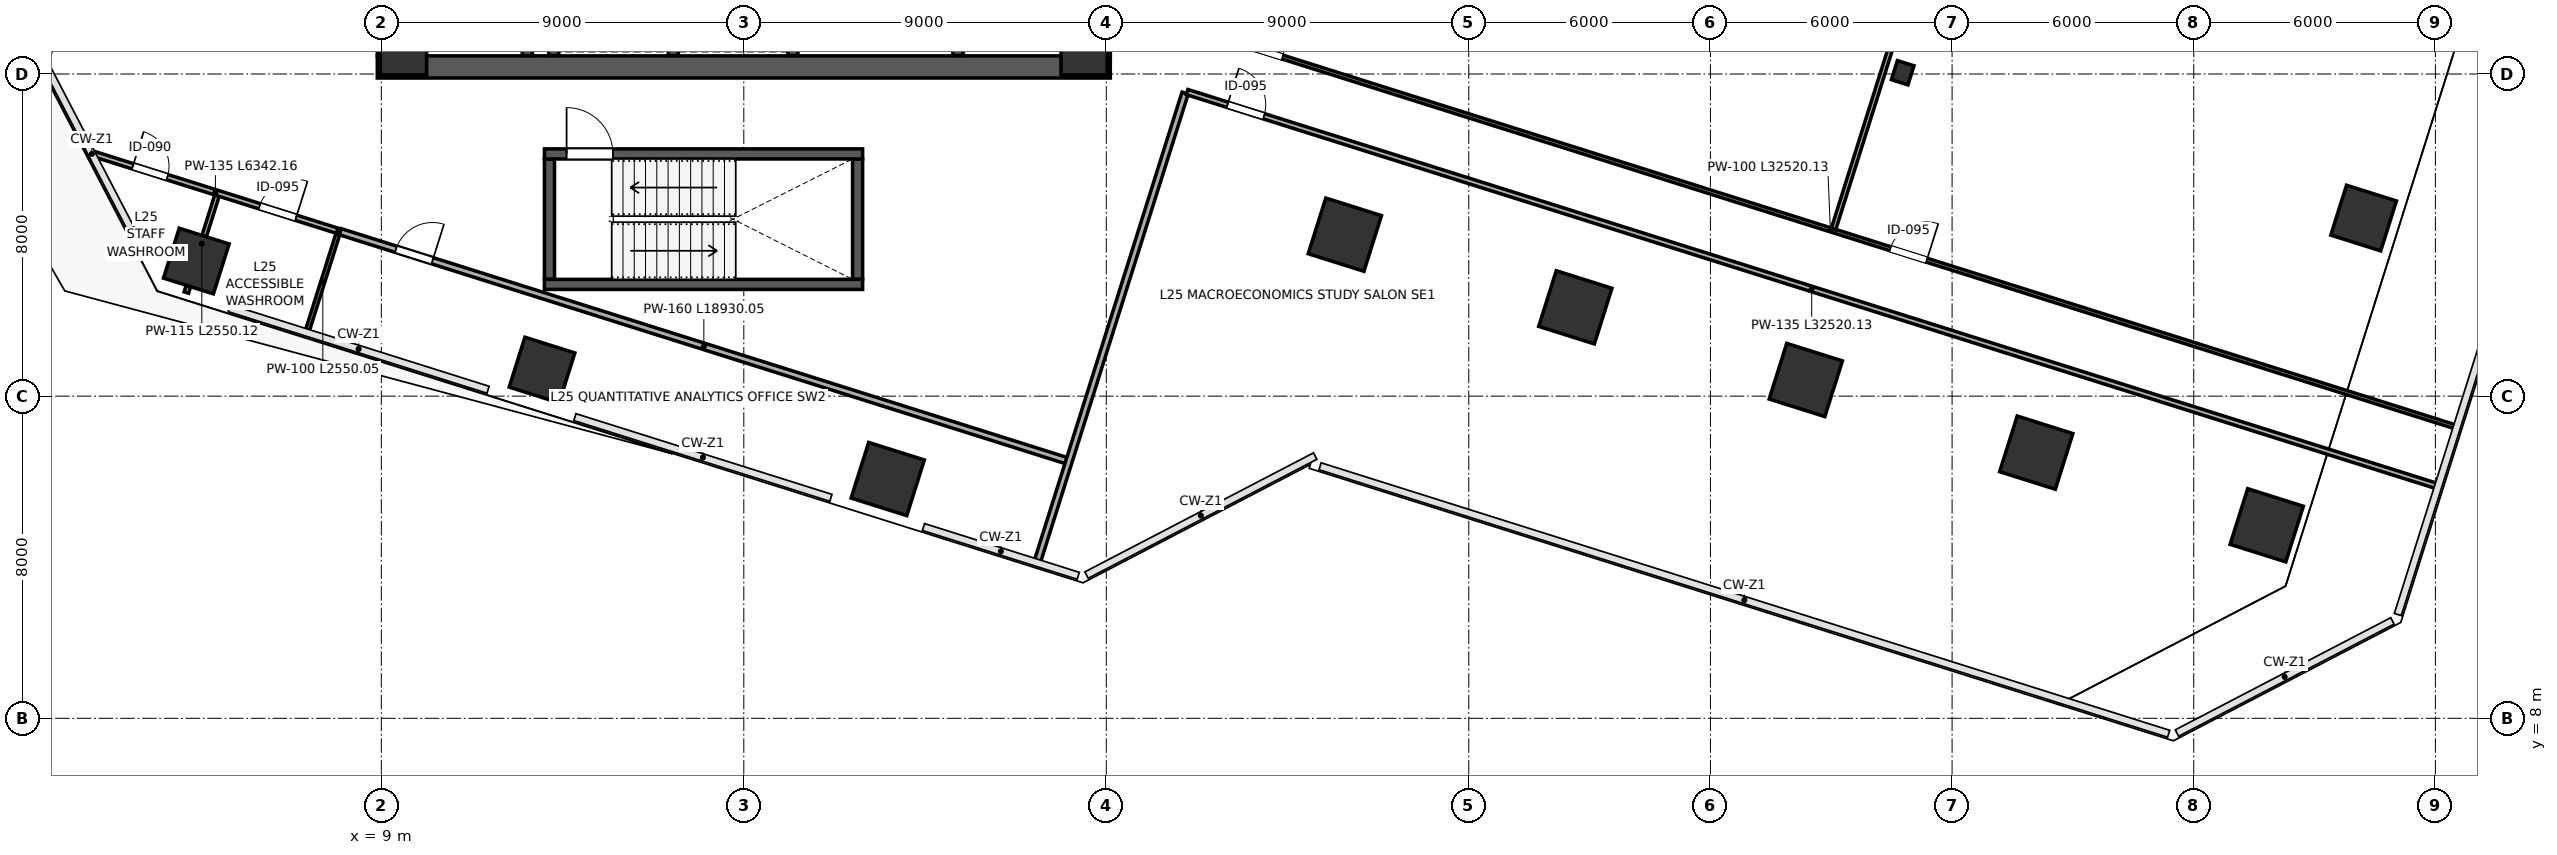
"""IFC4 building model, lengths in metres.
Left out: names, types, materials, properties, quantities, classifications, styles, units other than length and angle.
Written with IfcOpenShell. Run it as: python <this file> out.ifc"""

import sys

from ifc_helpers import new_model, si_unit, direction, frame, frame_2d, origin, origin_2d, place, context, subcontext, project, spatial, rectangle, i_section, extrude, source, transform, mapped, element, fill, save


model = new_model("IFC4")
c1 = context("Model", 3, precision=1e-05, world=origin(), true_north=direction((0.0, 1.0)))
c2 = subcontext(c1, "Body", "Model", "MODEL_VIEW")
j1 = project(units=[si_unit("LENGTHUNIT", "METRE"), si_unit("PLANEANGLEUNIT", "RADIAN")], contexts=[c1])
p1 = place(None, origin())
s1 = spatial("IfcSite", under=j1, at=p1, CompositionType="ELEMENT")
p2 = place(p1, origin())
s2 = spatial("IfcBuilding", under=s1, at=p2, CompositionType="ELEMENT")
p3 = place(p2, frame((0.0, 0.0, 112.6)))
s3 = spatial("IfcBuildingStorey", under=s2, at=p3, CompositionType="ELEMENT", Elevation=112.6)
m1 = source(origin(), c2, "Body", "SweptSolid", [
    extrude(rectangle(XDim=1.15, YDim=1.15, at=origin_2d()), origin(), (0.0, 0.0, 1.0), 4.198),
])
for number, where, z_axis, x_axis in (
    (1, (9.55, 24.55, 0.001), (0.0, 0.0, 1.0), (1.0, 0.0, 0.0)),
    (2, (26.45, 24.55, 0.001), (0.0, 0.0, 1.0), (1.0, 0.0, 0.0)),
):
    element("IfcColumn", number, at=place(p3, frame(where, z_axis=z_axis, x_axis=x_axis)), inside=s3, PredefinedType="COLUMN", context=c2, shape_type="MappedRepresentation", body=[
        mapped(m1, transform((0.0, 0.0, 0.0), scale=1.0)),
    ])
m2 = source(origin(), c2, "Body", "SweptSolid", [
    extrude(rectangle(XDim=1.3, YDim=1.3, at=origin_2d()), origin(), (0.0, 0.0, 1.0), 4.198),
])
for number, where, z_axis, x_axis in (
    (3, (4.406, 19.355, 0.001), (0.0, 0.0, 1.0), (-0.954, 0.301, 0.0)),
    (4, (12.99, 16.648, 0.001), (0.0, 0.0, 1.0), (-0.954, 0.301, 0.0)),
):
    element("IfcColumn", number, at=place(p3, frame(where, z_axis=z_axis, x_axis=x_axis)), inside=s3, PredefinedType="COLUMN", context=c2, shape_type="MappedRepresentation", body=[
        mapped(m2, transform((0.0, 0.0, 0.0), scale=1.0)),
    ])
m3 = source(origin(), c2, "Body", "SweptSolid", [
    extrude(rectangle(XDim=1.45, YDim=1.45, at=origin_2d()), origin(), (0.0, 0.0, 1.0), 4.198),
])
p4 = place(p3, frame((21.573, 13.942, 0.001), z_axis=(0.0, 0.0, 1.0), x_axis=(-0.953716950748, 0.300705799504, 0.0)))
e5 = element("IfcColumn", 5, at=p4, inside=s3, PredefinedType="COLUMN", context=c2, shape_type="MappedRepresentation", body=[
    mapped(m3, transform((0.0, 0.0, 0.0), scale=1.0)),
])
m4 = source(origin(), c2, "Body", "SweptSolid", [
    extrude(rectangle(XDim=1.45, YDim=1.45, at=origin_2d()), origin(), (0.0, 0.0, 1.0), 4.198),
])
for number, where, z_axis, x_axis in (
    (6, (32.923, 20.01, 0.001), (0.0, 0.0, 1.0), (-0.954, 0.301, 0.0)),
    (7, (38.646, 18.206, 0.001), (0.0, 0.0, 1.0), (-0.954, 0.301, 0.0)),
    (8, (44.368, 16.402, 0.001), (0.0, 0.0, 1.0), (-0.954, 0.301, 0.0)),
):
    element("IfcColumn", number, at=place(p3, frame(where, z_axis=z_axis, x_axis=x_axis)), inside=s3, PredefinedType="COLUMN", context=c2, shape_type="MappedRepresentation", body=[
        mapped(m4, transform((0.0, 0.0, 0.0), scale=1.0)),
    ])
m5 = source(origin(), c2, "Body", "SweptSolid", [
    extrude(i_section(OverallWidth=0.432, OverallDepth=0.498, WebThickness=0.056, FlangeThickness=0.089, FilletRadius=0.015, at=origin_2d()), origin(), (0.0, 0.0, 1.0), 4.198),
])
p5 = place(p3, frame((46.773, 24.031, 0.001), z_axis=(0.0, 0.0, 1.0), x_axis=(-0.953716950748, 0.300705799504, 0.0)))
e9 = element("IfcColumn", 9, at=p5, inside=s3, PredefinedType="COLUMN", context=c2, shape_type="MappedRepresentation", body=[
    mapped(m5, transform((0.0, 0.0, 0.0), scale=1.0)),
])
p6 = place(p3, frame((50.09, 14.597, 0.001), z_axis=(0.0, 0.0, 1.0), x_axis=(-0.953716950748, 0.300705799504, 0.0)))
e10 = element("IfcColumn", 10, at=p6, inside=s3, PredefinedType="COLUMN", context=c2, shape_type="MappedRepresentation", body=[
    mapped(m4, transform((0.0, 0.0, 0.0), scale=1.0)),
])
p7 = place(p3, frame((55.812, 12.793, 0.001), z_axis=(0.0, 0.0, 1.0), x_axis=(-0.953716950748, 0.300705799504, 0.0)))
e11 = element("IfcColumn", 11, at=p7, inside=s3, PredefinedType="COLUMN", context=c2, shape_type="MappedRepresentation", body=[
    mapped(m3, transform((0.0, 0.0, 0.0), scale=1.0)),
])
p8 = place(p3, frame((58.218, 20.423, 0.001), z_axis=(0.0, 0.0, 1.0), x_axis=(-0.953716950748, 0.300705799504, 0.0)))
e12 = element("IfcColumn", 12, at=p8, inside=s3, PredefinedType="COLUMN", context=c2, shape_type="MappedRepresentation", body=[
    mapped(m2, transform((0.0, 0.0, 0.0), scale=1.0)),
])
p9 = place(p3, frame((9.175, 24.45, 0.0), z_axis=(0.0, 0.0, 1.0), x_axis=(0.0, 1.0, 0.0)))
e13 = element("IfcWall", 13, at=p9, inside=s3, PredefinedType="SHEAR", context=c2, shape_type="SweptSolid", body=[
    extrude(rectangle(XDim=15.1, YDim=0.55, at=frame_2d((7.55, 0.0))), origin(), (0.0, 0.0, 1.0), 3.96),
])
p10 = place(p3, frame((26.825, 24.45, 0.0), z_axis=(0.0, 0.0, 1.0), x_axis=(0.0, 1.0, 0.0)))
e14 = element("IfcWall", 14, at=p10, inside=s3, PredefinedType="SHEAR", context=c2, shape_type="SweptSolid", body=[
    extrude(rectangle(XDim=15.1, YDim=0.55, at=frame_2d((7.55, 0.0))), origin(), (0.0, 0.0, 1.0), 3.96),
])
p11 = place(p10, frame((8.6, 0.0, 0.0)))
e15 = element("IfcOpeningElement", 15, at=p11, cuts=e14, PredefinedType="OPENING", context=c2, shape_type="SweptSolid", body=[
    extrude(rectangle(XDim=1.15, YDim=2.2, at=frame_2d((0.575, 1.1))), frame((0.0, 0.285, 0.0), z_axis=(0.0, -1.0, 0.0), x_axis=(1.0, 0.0, 0.0)), (0.0, 0.0, 1.0), 0.57),
])
p12 = place(p3, frame((8.9, 24.175, 0.0), z_axis=(0.0, 0.0, 1.0), x_axis=(1.0, 0.0, 0.0)))
e16 = element("IfcWall", 16, at=p12, inside=s3, PredefinedType="SHEAR", context=c2, shape_type="SweptSolid", body=[
    extrude(rectangle(XDim=18.2, YDim=0.55, at=frame_2d((9.1, 0.0))), origin(), (0.0, 0.0, 1.0), 3.96),
])
p13 = place(p3, frame((12.625, 24.46, 0.0), z_axis=(0.0, 0.0, 1.0), x_axis=(0.0, 1.0, 0.0)))
e17 = element("IfcWall", 17, at=p13, inside=s3, PredefinedType="SHEAR", context=c2, shape_type="SweptSolid", body=[
    extrude(rectangle(XDim=7.49, YDim=0.25, at=frame_2d((3.745, 0.0))), origin(), (0.0, 0.0, 1.0), 3.96),
])
p14 = place(p13, frame((5.85, 0.0, 0.0)))
e18 = element("IfcOpeningElement", 18, at=p14, cuts=e17, PredefinedType="OPENING", context=c2, shape_type="SweptSolid", body=[
    extrude(rectangle(XDim=1.15, YDim=2.2, at=frame_2d((0.575, 1.1))), frame((0.0, 0.135, 0.0), z_axis=(0.0, -1.0, 0.0), x_axis=(1.0, 0.0, 0.0)), (0.0, 0.0, 1.0), 0.27),
])
p15 = place(p3, frame((23.315, 24.46, 0.0), z_axis=(0.0, 0.0, 1.0), x_axis=(0.0, 1.0, 0.0)))
e19 = element("IfcWall", 19, at=p15, inside=s3, PredefinedType="SHEAR", context=c2, shape_type="SweptSolid", body=[
    extrude(rectangle(XDim=7.49, YDim=0.25, at=frame_2d((3.745, 0.0))), origin(), (0.0, 0.0, 1.0), 3.96),
])
for number, where, z_axis, x_axis in (
    (20, (13.28, 24.46, 0.0), (0.0, 0.0, 1.0), (0.0, 1.0, 0.0)),
    (21, (16.25, 24.46, 0.0), (0.0, 0.0, 1.0), (0.0, 1.0, 0.0)),
    (22, (19.22, 24.46, 0.0), (0.0, 0.0, 1.0), (0.0, 1.0, 0.0)),
):
    element("IfcWall", number, at=place(p3, frame(where, z_axis=z_axis, x_axis=x_axis)), inside=s3, PredefinedType="SHEAR", context=c2, shape_type="SweptSolid", body=[
        extrude(rectangle(XDim=3.49, YDim=0.25, at=frame_2d((1.745, 0.0))), origin(), (0.0, 0.0, 1.0), 3.96),
    ])
for number, where, z_axis, x_axis in (
    (23, (13.175, 18.9, 0.0), (0.0, 0.0, 1.0), (0.0, 1.0, 0.0)),
    (24, (20.825, 18.9, 0.0), (0.0, 0.0, 1.0), (0.0, 1.0, 0.0)),
):
    element("IfcWall", number, at=place(p3, frame(where, z_axis=z_axis, x_axis=x_axis)), inside=s3, PredefinedType="SHEAR", context=c2, shape_type="SweptSolid", body=[
        extrude(rectangle(XDim=2.99, YDim=0.25, at=frame_2d((1.495, 0.0))), origin(), (0.0, 0.0, 1.0), 3.96),
    ])
p16 = place(p3, frame((13.05, 18.775, 0.0), z_axis=(0.0, 0.0, 1.0), x_axis=(1.0, 0.0, 0.0)))
e25 = element("IfcWall", 25, at=p16, inside=s3, PredefinedType="SHEAR", context=c2, shape_type="SweptSolid", body=[
    extrude(rectangle(XDim=7.9, YDim=0.25, at=frame_2d((3.95, 0.0))), origin(), (0.0, 0.0, 1.0), 3.96),
])
p17 = place(p3, frame((13.05, 22.015, 0.0), z_axis=(0.0, 0.0, 1.0), x_axis=(1.0, 0.0, 0.0)))
e26 = element("IfcWall", 26, at=p17, inside=s3, PredefinedType="SHEAR", context=c2, shape_type="SweptSolid", body=[
    extrude(rectangle(XDim=7.9, YDim=0.25, at=frame_2d((3.95, 0.0))), origin(), (0.0, 0.0, 1.0), 3.96),
])
p18 = place(p17, frame((0.55, 0.0, 0.0)))
e27 = element("IfcOpeningElement", 27, at=p18, cuts=e26, PredefinedType="OPENING", context=c2, shape_type="SweptSolid", body=[
    extrude(rectangle(XDim=1.15, YDim=2.2, at=frame_2d((0.575, 1.1))), frame((0.0, 0.135, 0.0), z_axis=(0.0, -1.0, 0.0), x_axis=(1.0, 0.0, 0.0)), (0.0, 0.0, 1.0), 0.27),
])
p19 = place(p3, frame((4.16, 18.573, 0.0), z_axis=(0.0, 0.0, 1.0), x_axis=(0.300618147946, 0.95374458275, 0.0)))
e28 = element("IfcWall", 28, at=p19, inside=s3, PredefinedType="PARTITIONING", context=c2, shape_type="SweptSolid", body=[
    extrude(rectangle(XDim=2.55, YDim=0.115, at=frame_2d((1.275, 0.0))), origin(), (0.0, 0.0, 1.0), 3.095),
])
p20 = place(p3, frame((7.164, 17.625, 0.0), z_axis=(0.0, 0.0, 1.0), x_axis=(0.300705230461, 0.953717130167, 0.0)))
e29 = element("IfcWall", 29, at=p20, inside=s3, PredefinedType="PARTITIONING", context=c2, shape_type="SweptSolid", body=[
    extrude(rectangle(XDim=2.55, YDim=0.1, at=frame_2d((1.275, 0.0))), origin(), (0.0, 0.0, 1.0), 3.095),
])
p21 = place(p3, frame((1.856, 22.015, 0.0), z_axis=(0.0, 0.0, 1.0), x_axis=(0.953711734195, -0.300722343796, 0.0)))
e30 = element("IfcWall", 30, at=p21, inside=s3, PredefinedType="PARTITIONING", context=c2, shape_type="SweptSolid", body=[
    extrude(rectangle(XDim=6.342, YDim=0.135, at=frame_2d((3.171, 0.0))), origin(), (0.0, 0.0, 1.0), 3.96),
])
p22 = place(p21, frame((1.02, 0.0, 0.0)))
e31 = element("IfcOpeningElement", 31, at=p22, cuts=e30, PredefinedType="OPENING", context=c2, shape_type="SweptSolid", body=[
    extrude(rectangle(XDim=0.9, YDim=2.15, at=frame_2d((0.45, 1.075))), frame((0.0, 0.078, 0.0), z_axis=(0.0, -1.0, 0.0), x_axis=(1.0, 0.0, 0.0)), (0.0, 0.0, 1.0), 0.155),
])
p23 = place(p21, frame((4.32, 0.0, 0.0)))
e32 = element("IfcOpeningElement", 32, at=p23, cuts=e30, PredefinedType="OPENING", context=c2, shape_type="SweptSolid", body=[
    extrude(rectangle(XDim=0.95, YDim=2.15, at=frame_2d((0.475, 1.075))), frame((0.0, 0.078, 0.0), z_axis=(0.0, -1.0, 0.0), x_axis=(1.0, 0.0, 0.0)), (0.0, 0.0, 1.0), 0.155),
])
p24 = place(p3, frame((7.981, 20.084, 0.0), z_axis=(0.0, 0.0, 1.0), x_axis=(0.953717062222, -0.300705445953, 0.0)))
e33 = element("IfcWall", 33, at=p24, inside=s3, PredefinedType="PARTITIONING", context=c2, shape_type="SweptSolid", body=[
    extrude(rectangle(XDim=18.93, YDim=0.16, at=frame_2d((9.465, 0.0))), origin(), (0.0, 0.0, 1.0), 3.96),
])
p25 = place(p24, frame((1.45, 0.0, 0.0)))
e34 = element("IfcOpeningElement", 34, at=p25, cuts=e33, PredefinedType="OPENING", context=c2, shape_type="SweptSolid", body=[
    extrude(rectangle(XDim=0.95, YDim=2.15, at=frame_2d((0.475, 1.075))), frame((0.0, 0.09, 0.0), z_axis=(0.0, -1.0, 0.0), x_axis=(1.0, 0.0, 0.0)), (0.0, 0.0, 1.0), 0.18),
])
p26 = place(p3, frame((25.294, 11.909, 0.0), z_axis=(0.0, 0.0, 1.0), x_axis=(0.300707324156, 0.953716470026, 0.0)))
e35 = element("IfcWall", 35, at=p26, inside=s3, PredefinedType="PARTITIONING", context=c2, shape_type="SweptSolid", body=[
    extrude(rectangle(XDim=12.18, YDim=0.16, at=frame_2d((6.09, 0.0))), origin(), (0.0, 0.0, 1.0), 3.96),
])
p27 = place(p3, frame((29.47, 25.02, 0.0), z_axis=(0.0, 0.0, 1.0), x_axis=(0.953716794744, -0.300706294286, 0.0)))
e36 = element("IfcWall", 36, at=p27, inside=s3, PredefinedType="PARTITIONING", context=c2, shape_type="SweptSolid", body=[
    extrude(rectangle(XDim=32.52, YDim=0.1, at=frame_2d((16.26, 0.0))), origin(), (0.0, 0.0, 1.0), 3.095),
])
p28 = place(p27, frame((1.05, 0.0, 0.0)))
e37 = element("IfcOpeningElement", 37, at=p28, cuts=e36, PredefinedType="OPENING", context=c2, shape_type="SweptSolid", body=[
    extrude(rectangle(XDim=0.95, YDim=2.15, at=frame_2d((0.475, 1.075))), frame((0.0, 0.06, 0.0), z_axis=(0.0, -1.0, 0.0), x_axis=(1.0, 0.0, 0.0)), (0.0, 0.0, 1.0), 0.12),
])
p29 = place(p27, frame((17.82, 0.0, 0.0)))
e38 = element("IfcOpeningElement", 38, at=p29, cuts=e36, PredefinedType="OPENING", context=c2, shape_type="SweptSolid", body=[
    extrude(rectangle(XDim=0.95, YDim=2.15, at=frame_2d((0.475, 1.075))), frame((0.0, 0.06, 0.0), z_axis=(0.0, -1.0, 0.0), x_axis=(1.0, 0.0, 0.0)), (0.0, 0.0, 1.0), 0.12),
])
p30 = place(p3, frame((29.007, 23.552, 0.0), z_axis=(0.0, 0.0, 1.0), x_axis=(0.953718947743, -0.300699465773, 0.0)))
e39 = element("IfcWall", 39, at=p30, inside=s3, PredefinedType="PARTITIONING", context=c2, shape_type="SweptSolid", body=[
    extrude(rectangle(XDim=32.52, YDim=0.135, at=frame_2d((16.26, 0.0))), origin(), (0.0, 0.0, 1.0), 3.095),
])
p31 = place(p30, frame((1.05, 0.0, 0.0)))
e40 = element("IfcOpeningElement", 40, at=p31, cuts=e39, PredefinedType="OPENING", context=c2, shape_type="SweptSolid", body=[
    extrude(rectangle(XDim=0.95, YDim=2.15, at=frame_2d((0.475, 1.075))), frame((0.0, 0.078, 0.0), z_axis=(0.0, -1.0, 0.0), x_axis=(1.0, 0.0, 0.0)), (0.0, 0.0, 1.0), 0.155),
])
p32 = place(p3, frame((45.056, 20.148, 0.0), z_axis=(0.0, 0.0, 1.0), x_axis=(0.300712228368, 0.953714923712, 0.0)))
e41 = element("IfcWall", 41, at=p32, inside=s3, PredefinedType="PARTITIONING", context=c2, shape_type="SweptSolid", body=[
    extrude(rectangle(XDim=20.24, YDim=0.115, at=frame_2d((10.12, 0.0))), origin(), (0.0, 0.0, 1.0), 3.323),
])
m6 = source(origin(), c2, "Body", "SweptSolid", [
    extrude(rectangle(XDim=1.15, YDim=2.2, at=frame_2d((0.575, 1.1))), frame((0.0, 0.025, 0.0), z_axis=(0.0, -1.0, 0.0), x_axis=(1.0, 0.0, 0.0)), (0.0, 0.0, 1.0), 0.05),
])
p33 = place(p18, origin())
e42 = element("IfcDoor", 42, at=p33, inside=s3, OperationType="SINGLE_SWING_LEFT", PredefinedType="DOOR", context=c2, shape_type="MappedRepresentation", body=[
    mapped(m6, transform((0.0, 0.0, 0.0), scale=1.0)),
])
fill(e27, e42)
m7 = source(origin(), c2, "Body", "SweptSolid", [
    extrude(rectangle(XDim=0.9, YDim=2.15, at=frame_2d((0.45, 1.075))), frame((0.0, 0.025, 0.0), z_axis=(0.0, -1.0, 0.0), x_axis=(1.0, 0.0, 0.0)), (0.0, 0.0, 1.0), 0.05),
])
p34 = place(p22, origin())
e43 = element("IfcDoor", 43, at=p34, inside=s3, OperationType="SINGLE_SWING_LEFT", PredefinedType="DOOR", context=c2, shape_type="MappedRepresentation", body=[
    mapped(m7, transform((0.0, 0.0, 0.0), scale=1.0)),
])
fill(e31, e43)
m8 = source(origin(), c2, "Body", "SweptSolid", [
    extrude(rectangle(XDim=0.95, YDim=2.15, at=frame_2d((0.475, 1.075))), frame((0.0, 0.025, 0.0), z_axis=(0.0, -1.0, 0.0), x_axis=(1.0, 0.0, 0.0)), (0.0, 0.0, 1.0), 0.05),
])
p35 = place(p23, origin())
e44 = element("IfcDoor", 44, at=p35, inside=s3, OperationType="SINGLE_SWING_RIGHT", PredefinedType="DOOR", context=c2, shape_type="MappedRepresentation", body=[
    mapped(m8, transform((0.0, 0.0, 0.0), scale=1.0)),
])
fill(e32, e44)
m9 = source(origin(), c2, "Body", "SweptSolid", [
    extrude(rectangle(XDim=0.95, YDim=2.15, at=frame_2d((0.475, 1.075))), frame((0.0, 0.025, 0.0), z_axis=(0.0, -1.0, 0.0), x_axis=(1.0, 0.0, 0.0)), (0.0, 0.0, 1.0), 0.05),
])
p36 = place(p25, origin())
e45 = element("IfcDoor", 45, at=p36, inside=s3, OperationType="SINGLE_SWING_RIGHT", PredefinedType="DOOR", context=c2, shape_type="MappedRepresentation", body=[
    mapped(m9, transform((0.0, 0.0, 0.0), scale=1.0)),
])
fill(e34, e45)
p37 = place(p28, origin())
e46 = element("IfcDoor", 46, at=p37, inside=s3, OperationType="SINGLE_SWING_LEFT", PredefinedType="DOOR", context=c2, shape_type="MappedRepresentation", body=[
    mapped(m8, transform((0.0, 0.0, 0.0), scale=1.0)),
])
fill(e37, e46)
p38 = place(p29, origin())
e47 = element("IfcDoor", 47, at=p38, inside=s3, OperationType="SINGLE_SWING_RIGHT", PredefinedType="DOOR", context=c2, shape_type="MappedRepresentation", body=[
    mapped(m8, transform((0.0, 0.0, 0.0), scale=1.0)),
])
fill(e38, e47)
p39 = place(p31, origin())
e48 = element("IfcDoor", 48, at=p39, inside=s3, OperationType="SINGLE_SWING_LEFT", PredefinedType="DOOR", context=c2, shape_type="MappedRepresentation", body=[
    mapped(m8, transform((0.0, 0.0, 0.0), scale=1.0)),
])
fill(e40, e48)
save(model, sys.argv[1])
